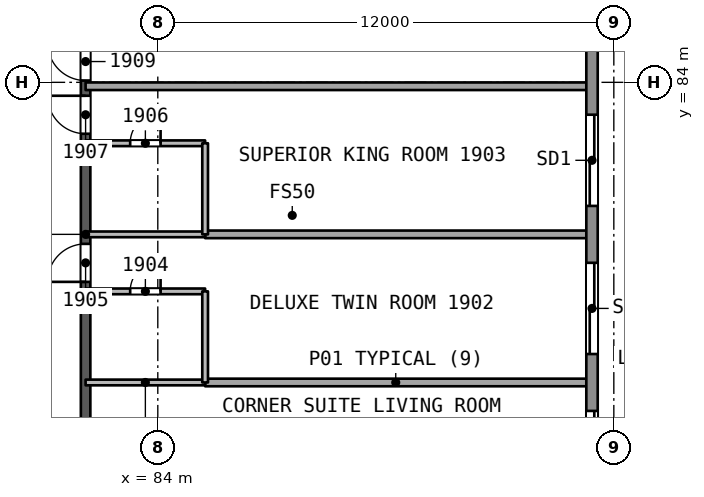
"""IFC4 building model, lengths in metres.
Left out: names, types, materials, properties, quantities, classifications, styles, units other than length and angle.
Written with IfcOpenShell. Run it as: python <this file> out.ifc"""

import sys

from ifc_helpers import new_model, si_unit, direction, frame, frame_2d, origin, place, context, subcontext, project, spatial, rectangle, extrude, element, fill, save


model = new_model("IFC4")
c1 = context("Model", 3, precision=1e-05, world=origin(), true_north=direction((0.0, 1.0)))
c2 = subcontext(c1, "Body", "Model", "MODEL_VIEW")
j1 = project(units=[si_unit("LENGTHUNIT", "METRE"), si_unit("PLANEANGLEUNIT", "RADIAN")], contexts=[c1])
p1 = place(None, origin())
s1 = spatial("IfcSite", under=j1, at=p1, CompositionType="ELEMENT")
p2 = place(p1, origin())
s2 = spatial("IfcBuilding", under=s1, at=p2, CompositionType="ELEMENT")
p3 = place(p2, frame((0.0, 0.0, 83.2)))
s3 = spatial("IfcBuildingStorey", under=s2, at=p3, CompositionType="ELEMENT", Elevation=83.2)
p4 = place(p3, frame((82.1, 72.206, 0.0), z_axis=(0.0, 0.0, 1.0), x_axis=(0.0, 1.0, 0.0)))
e1 = element("IfcWall", 1, at=p4, inside=s3, PredefinedType="SHEAR", context=c2, shape_type="SweptSolid", body=[
    extrude(rectangle(XDim=15.588, YDim=0.25, at=frame_2d((7.794, 0.0))), origin(), (0.0, 0.0, 1.0), 3.2),
])
p5 = place(p4, frame((1.448, 0.0, 0.0)))
e2 = element("IfcOpeningElement", 2, at=p5, cuts=e1, PredefinedType="OPENING", context=c2, shape_type="SweptSolid", body=[
    extrude(rectangle(XDim=1.0, YDim=2.1, at=frame_2d((0.5, 1.05))), frame((0.0, 0.135, 0.0), z_axis=(0.0, -1.0, 0.0), x_axis=(1.0, 0.0, 0.0)), (0.0, 0.0, 1.0), 0.271),
])
p6 = place(p4, frame((6.544, 0.0, 0.0)))
e3 = element("IfcOpeningElement", 3, at=p6, cuts=e1, PredefinedType="OPENING", context=c2, shape_type="SweptSolid", body=[
    extrude(rectangle(XDim=1.0, YDim=2.1, at=frame_2d((0.5, 1.05))), frame((0.0, 0.135, 0.0), z_axis=(0.0, -1.0, 0.0), x_axis=(1.0, 0.0, 0.0)), (0.0, 0.0, 1.0), 0.271),
])
p7 = place(p4, frame((10.441, 0.0, 0.0)))
e4 = element("IfcOpeningElement", 4, at=p7, cuts=e1, PredefinedType="OPENING", context=c2, shape_type="SweptSolid", body=[
    extrude(rectangle(XDim=1.0, YDim=2.1, at=frame_2d((0.5, 1.05))), frame((0.0, 0.135, 0.0), z_axis=(0.0, -1.0, 0.0), x_axis=(1.0, 0.0, 0.0)), (0.0, 0.0, 1.0), 0.271),
])
p8 = place(p4, frame((11.841, 0.0, 0.0)))
e5 = element("IfcOpeningElement", 5, at=p8, cuts=e1, PredefinedType="OPENING", context=c2, shape_type="SweptSolid", body=[
    extrude(rectangle(XDim=1.0, YDim=2.1, at=frame_2d((0.5, 1.05))), frame((0.0, 0.135, 0.0), z_axis=(0.0, -1.0, 0.0), x_axis=(1.0, 0.0, 0.0)), (0.0, 0.0, 1.0), 0.271),
])
p9 = place(p3, frame((95.277, 76.103, 0.0), z_axis=(0.0, 0.0, 1.0), x_axis=(-1.0, 0.0, 0.0)))
e6 = element("IfcWall", 6, at=p9, inside=s3, PredefinedType="PARTITIONING", context=c2, shape_type="SweptSolid", body=[
    extrude(rectangle(XDim=10.031, YDim=0.2, at=frame_2d((5.016, 0.0))), origin(), (0.0, 0.0, 1.0), 3.2),
])
p10 = place(p3, frame((85.245, 76.103, 0.0), z_axis=(0.0, 0.0, 1.0), x_axis=(-1.0, 0.0, 0.0)))
e7 = element("IfcWall", 7, at=p10, inside=s3, PredefinedType="PARTITIONING", context=c2, shape_type="SweptSolid", body=[
    extrude(rectangle(XDim=3.145, YDim=0.15, at=frame_2d((1.573, 0.0))), origin(), (0.0, 0.0, 1.0), 3.2),
])
p11 = place(p3, frame((82.1, 78.5, 0.0), z_axis=(0.0, 0.0, 1.0), x_axis=(1.0, 0.0, 0.0)))
e8 = element("IfcWall", 8, at=p11, inside=s3, PredefinedType="PARTITIONING", context=c2, shape_type="SweptSolid", body=[
    extrude(rectangle(XDim=3.145, YDim=0.15, at=frame_2d((1.573, 0.0))), origin(), (0.0, 0.0, 1.0), 3.2),
])
p12 = place(p11, frame((1.173, 0.0, 0.0)))
e9 = element("IfcOpeningElement", 9, at=p12, cuts=e8, PredefinedType="OPENING", context=c2, shape_type="SweptSolid", body=[
    extrude(rectangle(XDim=0.8, YDim=2.1, at=frame_2d((0.4, 1.05))), frame((0.0, 0.085, 0.0), z_axis=(0.0, -1.0, 0.0), x_axis=(1.0, 0.0, 0.0)), (0.0, 0.0, 1.0), 0.171),
])
p13 = place(p3, frame((85.245, 78.5, 0.0), z_axis=(0.0, 0.0, 1.0), x_axis=(0.0, -1.0, 0.0)))
e10 = element("IfcWall", 10, at=p13, inside=s3, PredefinedType="PARTITIONING", context=c2, shape_type="SweptSolid", body=[
    extrude(rectangle(XDim=2.397, YDim=0.15, at=frame_2d((1.199, 0.0))), origin(), (0.0, 0.0, 1.0), 3.2),
])
p14 = place(p3, frame((95.277, 80.0, 0.0), z_axis=(0.0, 0.0, 1.0), x_axis=(-1.0, 0.0, 0.0)))
e11 = element("IfcWall", 11, at=p14, inside=s3, PredefinedType="PARTITIONING", context=c2, shape_type="SweptSolid", body=[
    extrude(rectangle(XDim=10.031, YDim=0.2, at=frame_2d((5.016, 0.0))), origin(), (0.0, 0.0, 1.0), 3.2),
])
p15 = place(p3, frame((85.245, 80.0, 0.0), z_axis=(0.0, 0.0, 1.0), x_axis=(-1.0, 0.0, 0.0)))
e12 = element("IfcWall", 12, at=p15, inside=s3, PredefinedType="PARTITIONING", context=c2, shape_type="SweptSolid", body=[
    extrude(rectangle(XDim=3.145, YDim=0.15, at=frame_2d((1.573, 0.0))), origin(), (0.0, 0.0, 1.0), 3.2),
])
p16 = place(p3, frame((82.1, 82.397, 0.0), z_axis=(0.0, 0.0, 1.0), x_axis=(1.0, 0.0, 0.0)))
e13 = element("IfcWall", 13, at=p16, inside=s3, PredefinedType="PARTITIONING", context=c2, shape_type="SweptSolid", body=[
    extrude(rectangle(XDim=3.145, YDim=0.15, at=frame_2d((1.573, 0.0))), origin(), (0.0, 0.0, 1.0), 3.2),
])
p17 = place(p16, frame((1.173, 0.0, 0.0)))
e14 = element("IfcOpeningElement", 14, at=p17, cuts=e13, PredefinedType="OPENING", context=c2, shape_type="SweptSolid", body=[
    extrude(rectangle(XDim=0.8, YDim=2.1, at=frame_2d((0.4, 1.05))), frame((0.0, 0.085, 0.0), z_axis=(0.0, -1.0, 0.0), x_axis=(1.0, 0.0, 0.0)), (0.0, 0.0, 1.0), 0.171),
])
p18 = place(p3, frame((85.245, 82.397, 0.0), z_axis=(0.0, 0.0, 1.0), x_axis=(0.0, -1.0, 0.0)))
e15 = element("IfcWall", 15, at=p18, inside=s3, PredefinedType="PARTITIONING", context=c2, shape_type="SweptSolid", body=[
    extrude(rectangle(XDim=2.397, YDim=0.15, at=frame_2d((1.199, 0.0))), origin(), (0.0, 0.0, 1.0), 3.2),
])
p19 = place(p3, frame((95.277, 83.897, 0.0), z_axis=(0.0, 0.0, 1.0), x_axis=(-1.0, 0.0, 0.0)))
e16 = element("IfcWall", 16, at=p19, inside=s3, PredefinedType="PARTITIONING", context=c2, shape_type="SweptSolid", body=[
    extrude(rectangle(XDim=13.177, YDim=0.2, at=frame_2d((6.588, 0.0))), origin(), (0.0, 0.0, 1.0), 3.2),
])
p20 = place(p3, frame((95.426, 109.368, 0.0), z_axis=(0.0, 0.0, 1.0), x_axis=(0.0, -1.0, 0.0)))
e17 = element("IfcWall", 17, at=p20, inside=s3, PredefinedType="SOLIDWALL", context=c2, shape_type="SweptSolid", body=[
    extrude(rectangle(XDim=58.737, YDim=0.3, at=frame_2d((29.368, 0.0))), origin(), (0.0, 0.0, 1.0), 3.2),
])
p21 = place(p20, frame((34.014, 0.0, 0.0)))
e18 = element("IfcOpeningElement", 18, at=p21, cuts=e17, PredefinedType="OPENING", context=c2, shape_type="SweptSolid", body=[
    extrude(rectangle(XDim=2.4, YDim=2.4, at=frame_2d((1.2, 1.2))), frame((0.0, 0.161, 0.0), z_axis=(0.0, -1.0, 0.0), x_axis=(1.0, 0.0, 0.0)), (0.0, 0.0, 1.0), 0.321),
])
p22 = place(p20, frame((45.575, 0.0, 0.0)))
e19 = element("IfcOpeningElement", 19, at=p22, cuts=e17, PredefinedType="OPENING", context=c2, shape_type="SweptSolid", body=[
    extrude(rectangle(XDim=2.4, YDim=2.4, at=frame_2d((1.2, 1.2))), frame((0.0, 0.161, 0.0), z_axis=(0.0, -1.0, 0.0), x_axis=(1.0, 0.0, 0.0)), (0.0, 0.0, 1.0), 0.321),
])
p23 = place(p20, frame((30.117, 0.0, 0.0)))
e20 = element("IfcOpeningElement", 20, at=p23, cuts=e17, PredefinedType="OPENING", context=c2, shape_type="SweptSolid", body=[
    extrude(rectangle(XDim=2.4, YDim=2.4, at=frame_2d((1.2, 1.2))), frame((0.0, 0.161, 0.0), z_axis=(0.0, -1.0, 0.0), x_axis=(1.0, 0.0, 0.0)), (0.0, 0.0, 1.0), 0.321),
])
p24 = place(p20, frame((11.492, 0.0, 0.0)))
e21 = element("IfcOpeningElement", 21, at=p24, cuts=e17, PredefinedType="OPENING", context=c2, shape_type="SweptSolid", body=[
    extrude(rectangle(XDim=2.4, YDim=2.4, at=frame_2d((1.2, 1.2))), frame((0.0, 0.161, 0.0), z_axis=(0.0, -1.0, 0.0), x_axis=(1.0, 0.0, 0.0)), (0.0, 0.0, 1.0), 0.321),
])
p25 = place(p20, frame((26.22, 0.0, 0.0)))
e22 = element("IfcOpeningElement", 22, at=p25, cuts=e17, PredefinedType="OPENING", context=c2, shape_type="SweptSolid", body=[
    extrude(rectangle(XDim=2.4, YDim=2.4, at=frame_2d((1.2, 1.2))), frame((0.0, 0.161, 0.0), z_axis=(0.0, -1.0, 0.0), x_axis=(1.0, 0.0, 0.0)), (0.0, 0.0, 1.0), 0.321),
])
p26 = place(p3, frame((39.353, 83.005, 0.0), z_axis=(0.0, 0.0, 1.0), x_axis=(0.866025832118, 0.499999258104, 0.0)))
e23 = element("IfcWall", 23, at=p26, inside=s3, PredefinedType="SOLIDWALL", context=c2, shape_type="SweptSolid", body=[
    extrude(rectangle(XDim=58.737, YDim=0.3, at=frame_2d((29.368, 0.0))), origin(), (0.0, 0.0, 1.0), 3.2),
])
p27 = place(p26, frame((28.636, 0.0, 0.0)))
e24 = element("IfcOpeningElement", 24, at=p27, cuts=e23, PredefinedType="OPENING", context=c2, shape_type="SweptSolid", body=[
    extrude(rectangle(XDim=2.4, YDim=2.4, at=frame_2d((1.2, 1.2))), frame((0.0, 0.161, 0.0), z_axis=(0.0, -1.0, 0.0), x_axis=(1.0, 0.0, 0.0)), (0.0, 0.0, 1.0), 0.321),
])
p28 = place(p26, frame((33.936, 0.0, 0.0)))
e25 = element("IfcOpeningElement", 25, at=p28, cuts=e23, PredefinedType="OPENING", context=c2, shape_type="SweptSolid", body=[
    extrude(rectangle(XDim=2.4, YDim=2.4, at=frame_2d((1.2, 1.2))), frame((0.0, 0.161, 0.0), z_axis=(0.0, -1.0, 0.0), x_axis=(1.0, 0.0, 0.0)), (0.0, 0.0, 1.0), 0.321),
])
p29 = place(p26, frame((45.575, 0.0, 0.0)))
e26 = element("IfcOpeningElement", 26, at=p29, cuts=e23, PredefinedType="OPENING", context=c2, shape_type="SweptSolid", body=[
    extrude(rectangle(XDim=2.4, YDim=2.4, at=frame_2d((1.2, 1.2))), frame((0.0, 0.161, 0.0), z_axis=(0.0, -1.0, 0.0), x_axis=(1.0, 0.0, 0.0)), (0.0, 0.0, 1.0), 0.321),
])
p30 = place(p26, frame((22.868, 0.0, 0.0)))
e27 = element("IfcOpeningElement", 27, at=p30, cuts=e23, PredefinedType="OPENING", context=c2, shape_type="SweptSolid", body=[
    extrude(rectangle(XDim=2.4, YDim=2.4, at=frame_2d((1.2, 1.2))), frame((0.0, 0.161, 0.0), z_axis=(0.0, -1.0, 0.0), x_axis=(1.0, 0.0, 0.0)), (0.0, 0.0, 1.0), 0.321),
])
p31 = place(p26, frame((10.765, 0.0, 0.0)))
e28 = element("IfcOpeningElement", 28, at=p31, cuts=e23, PredefinedType="OPENING", context=c2, shape_type="SweptSolid", body=[
    extrude(rectangle(XDim=2.4, YDim=2.4, at=frame_2d((1.2, 1.2))), frame((0.0, 0.161, 0.0), z_axis=(0.0, -1.0, 0.0), x_axis=(1.0, 0.0, 0.0)), (0.0, 0.0, 1.0), 0.321),
])
p32 = place(p3, frame((90.221, 47.626, 0.0), z_axis=(0.0, 0.0, 1.0), x_axis=(-0.866025832118, 0.499999258104, 0.0)))
e29 = element("IfcWall", 29, at=p32, inside=s3, PredefinedType="SOLIDWALL", context=c2, shape_type="SweptSolid", body=[
    extrude(rectangle(XDim=58.737, YDim=0.3, at=frame_2d((29.368, 0.0))), origin(), (0.0, 0.0, 1.0), 3.2),
])
p33 = place(p32, frame((32.065, 0.0, 0.0)))
e30 = element("IfcOpeningElement", 30, at=p33, cuts=e29, PredefinedType="OPENING", context=c2, shape_type="SweptSolid", body=[
    extrude(rectangle(XDim=2.4, YDim=2.4, at=frame_2d((1.2, 1.2))), frame((0.0, 0.161, 0.0), z_axis=(0.0, -1.0, 0.0), x_axis=(1.0, 0.0, 0.0)), (0.0, 0.0, 1.0), 0.321),
])
p34 = place(p32, frame((45.575, 0.0, 0.0)))
e31 = element("IfcOpeningElement", 31, at=p34, cuts=e29, PredefinedType="OPENING", context=c2, shape_type="SweptSolid", body=[
    extrude(rectangle(XDim=2.4, YDim=2.4, at=frame_2d((1.2, 1.2))), frame((0.0, 0.161, 0.0), z_axis=(0.0, -1.0, 0.0), x_axis=(1.0, 0.0, 0.0)), (0.0, 0.0, 1.0), 0.321),
])
p35 = place(p32, frame((13.441, 0.0, 0.0)))
e32 = element("IfcOpeningElement", 32, at=p35, cuts=e29, PredefinedType="OPENING", context=c2, shape_type="SweptSolid", body=[
    extrude(rectangle(XDim=2.4, YDim=2.4, at=frame_2d((1.2, 1.2))), frame((0.0, 0.161, 0.0), z_axis=(0.0, -1.0, 0.0), x_axis=(1.0, 0.0, 0.0)), (0.0, 0.0, 1.0), 0.321),
])
p36 = place(p12, origin())
e33 = element("IfcDoor", 33, at=p36, inside=s3, OperationType="SINGLE_SWING_RIGHT", PredefinedType="NOTDEFINED", context=c2, shape_type="SweptSolid", body=[
    extrude(rectangle(XDim=0.8, YDim=2.1, at=frame_2d((0.4, 1.05))), frame((0.0, 0.025, 0.0), z_axis=(0.0, -1.0, 0.0), x_axis=(1.0, 0.0, 0.0)), (0.0, 0.0, 1.0), 0.05),
])
fill(e9, e33)
p37 = place(p6, origin())
e34 = element("IfcDoor", 34, at=p37, inside=s3, OperationType="SINGLE_SWING_LEFT", PredefinedType="NOTDEFINED", context=c2, shape_type="SweptSolid", body=[
    extrude(rectangle(XDim=1.0, YDim=2.1, at=frame_2d((0.5, 1.05))), frame((0.0, 0.025, 0.0), z_axis=(0.0, -1.0, 0.0), x_axis=(1.0, 0.0, 0.0)), (0.0, 0.0, 1.0), 0.05),
])
fill(e3, e34)
p38 = place(p17, origin())
e35 = element("IfcDoor", 35, at=p38, inside=s3, OperationType="SINGLE_SWING_RIGHT", PredefinedType="NOTDEFINED", context=c2, shape_type="SweptSolid", body=[
    extrude(rectangle(XDim=0.8, YDim=2.1, at=frame_2d((0.4, 1.05))), frame((0.0, 0.025, 0.0), z_axis=(0.0, -1.0, 0.0), x_axis=(1.0, 0.0, 0.0)), (0.0, 0.0, 1.0), 0.05),
])
fill(e14, e35)
p39 = place(p7, origin())
e36 = element("IfcDoor", 36, at=p39, inside=s3, OperationType="SINGLE_SWING_RIGHT", PredefinedType="NOTDEFINED", context=c2, shape_type="SweptSolid", body=[
    extrude(rectangle(XDim=1.0, YDim=2.1, at=frame_2d((0.5, 1.05))), frame((0.0, 0.025, 0.0), z_axis=(0.0, -1.0, 0.0), x_axis=(1.0, 0.0, 0.0)), (0.0, 0.0, 1.0), 0.05),
])
fill(e4, e36)
p40 = place(p8, origin())
e37 = element("IfcDoor", 37, at=p40, inside=s3, OperationType="SINGLE_SWING_RIGHT", PredefinedType="NOTDEFINED", context=c2, shape_type="SweptSolid", body=[
    extrude(rectangle(XDim=1.0, YDim=2.1, at=frame_2d((0.5, 1.05))), frame((0.0, 0.025, 0.0), z_axis=(0.0, -1.0, 0.0), x_axis=(1.0, 0.0, 0.0)), (0.0, 0.0, 1.0), 0.05),
])
fill(e5, e37)
p41 = place(p21, origin())
e38 = element("IfcDoor", 38, at=p41, inside=s3, OperationType="SLIDING_TO_LEFT", PredefinedType="NOTDEFINED", context=c2, shape_type="SweptSolid", body=[
    extrude(rectangle(XDim=2.4, YDim=2.4, at=frame_2d((1.2, 1.2))), frame((0.0, 0.025, 0.0), z_axis=(0.0, -1.0, 0.0), x_axis=(1.0, 0.0, 0.0)), (0.0, 0.0, 1.0), 0.05),
])
fill(e18, e38)
p42 = place(p23, origin())
e39 = element("IfcDoor", 39, at=p42, inside=s3, OperationType="SLIDING_TO_LEFT", PredefinedType="NOTDEFINED", context=c2, shape_type="SweptSolid", body=[
    extrude(rectangle(XDim=2.4, YDim=2.4, at=frame_2d((1.2, 1.2))), frame((0.0, 0.025, 0.0), z_axis=(0.0, -1.0, 0.0), x_axis=(1.0, 0.0, 0.0)), (0.0, 0.0, 1.0), 0.05),
])
fill(e20, e39)
p43 = place(p25, origin())
e40 = element("IfcDoor", 40, at=p43, inside=s3, OperationType="SLIDING_TO_LEFT", PredefinedType="NOTDEFINED", context=c2, shape_type="SweptSolid", body=[
    extrude(rectangle(XDim=2.4, YDim=2.4, at=frame_2d((1.2, 1.2))), frame((0.0, 0.025, 0.0), z_axis=(0.0, -1.0, 0.0), x_axis=(1.0, 0.0, 0.0)), (0.0, 0.0, 1.0), 0.05),
])
fill(e22, e40)
save(model, sys.argv[1])
